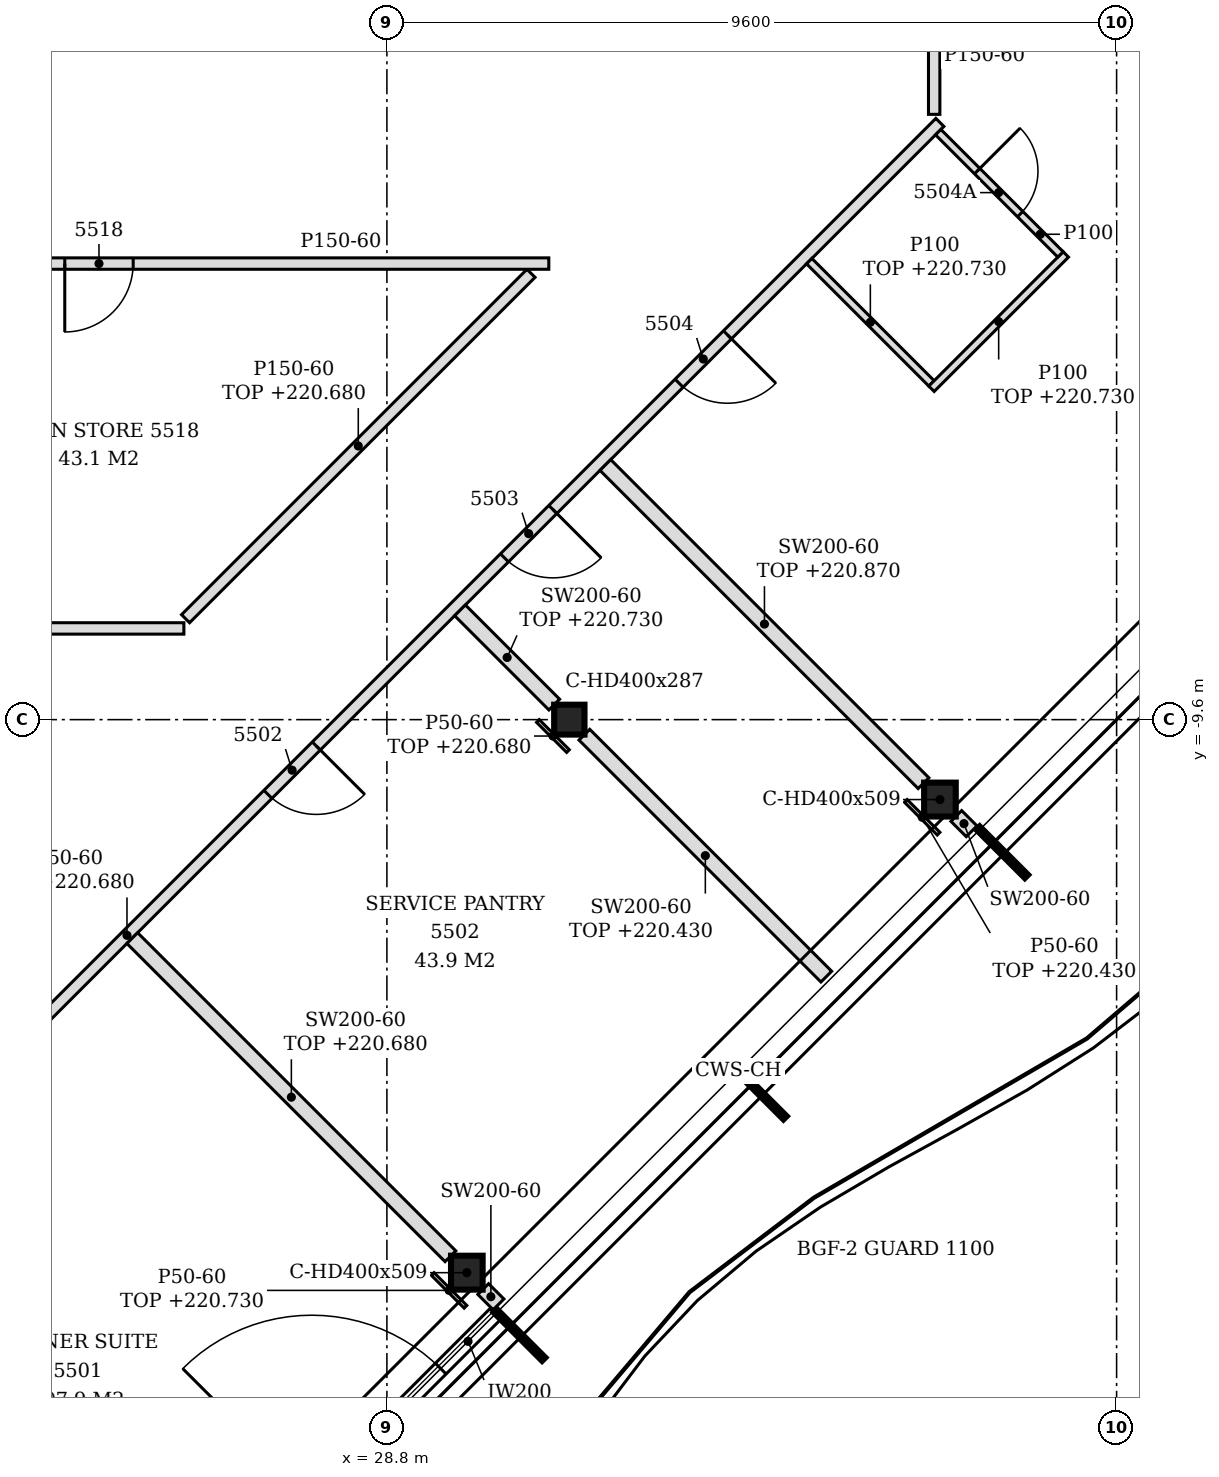
"""IFC4 building model, lengths in metres.
Left out: names, types, materials, properties, quantities, classifications, styles, units other than length and angle.
Written with IfcOpenShell. Run it as: python <this file> out.ifc"""

import sys

from ifc_helpers import new_model, si_unit, direction, frame, frame_2d, origin, origin_2d, place, context, subcontext, project, spatial, polyline, rectangle, i_section, outline, extrude, element, fill, save


model = new_model("IFC4")
c1 = context("Model", 3, precision=1e-05, world=origin(), true_north=direction((0.0, 1.0)))
c2 = subcontext(c1, "Body", "Model", "MODEL_VIEW")
j1 = project(units=[si_unit("LENGTHUNIT", "METRE"), si_unit("PLANEANGLEUNIT", "RADIAN")], contexts=[c1])
p1 = place(None, origin())
s1 = spatial("IfcSite", under=j1, at=p1, CompositionType="ELEMENT")
p2 = place(p1, origin())
s2 = spatial("IfcBuilding", under=s1, at=p2, CompositionType="ELEMENT")
p3 = place(p2, frame((0.0, 0.0, 217.8)))
s3 = spatial("IfcBuildingStorey", under=s2, at=p3, CompositionType="ELEMENT", Elevation=217.8)
for number, where, z_axis, x_axis in (
    (1, (29.852, -16.876, -0.15), (0.0, 0.0, 1.0), (1.0, 0.0, 0.0)),
    (2, (36.076, -10.652, -0.15), (0.0, 0.0, 1.0), (1.0, 0.0, 0.0)),
):
    element("IfcColumn", number, at=place(p3, frame(where, z_axis=z_axis, x_axis=x_axis)), inside=s3, PredefinedType="COLUMN", context=c2, shape_type="SweptSolid", body=[
        extrude(i_section(OverallWidth=0.416, OverallDepth=0.446, WebThickness=0.039, FlangeThickness=0.063, FilletRadius=0.015, at=origin_2d()), origin(), (0.0, 0.0, 1.0), 3.6),
    ])
p4 = place(p3, frame((31.2, -9.6, -0.15), z_axis=(0.0, 0.0, 1.0), x_axis=(1.0, 0.0, 0.0)))
e3 = element("IfcColumn", 3, at=p4, inside=s3, PredefinedType="COLUMN", context=c2, shape_type="SweptSolid", body=[
    extrude(i_section(OverallWidth=0.399, OverallDepth=0.393, WebThickness=0.023, FlangeThickness=0.037, FilletRadius=0.015, at=origin_2d()), origin(), (0.0, 0.0, 1.0), 3.6),
])
p5 = place(p3, frame((27.093, -20.553, 0.0), z_axis=(0.0, 0.0, 1.0), x_axis=(0.707079231393, 0.707134329907, 0.0)))
e4 = element("IfcWall", 4, at=p5, inside=s3, PredefinedType="NOTDEFINED", context=c2, shape_type="SweptSolid", body=[
    extrude(rectangle(XDim=4.431, YDim=0.2, at=frame_2d((2.215, 0.0))), origin(), (0.0, 0.0, 1.0), 3.45),
])
p6 = place(p5, frame((1.015, 0.0, 0.0)))
e5 = element("IfcOpeningElement", 5, at=p6, cuts=e4, PredefinedType="OPENING", context=c2, shape_type="SweptSolid", body=[
    extrude(rectangle(XDim=2.4, YDim=2.4, at=frame_2d((1.2, 1.2))), frame((0.0, 0.11, 0.0), z_axis=(0.0, -1.0, 0.0), x_axis=(1.0, 0.0, 0.0)), (0.0, 0.0, 1.0), 0.22),
])
p7 = place(p3, frame((30.269, -17.293, 0.0), z_axis=(0.0, 0.0, 1.0), x_axis=(-0.707106781187, 0.707106781187, 0.0)))
e6 = element("IfcWall", 6, at=p7, inside=s3, PredefinedType="PARTITIONING", context=c2, shape_type="SweptSolid", body=[
    extrude(rectangle(XDim=0.285, YDim=0.2, at=frame_2d((0.143, 0.0))), origin(), (0.0, 0.0, 1.0), 3.45),
])
p8 = place(p3, frame((21.146, -16.672, 0.0), z_axis=(0.0, 0.0, 1.0), x_axis=(0.707100999376, 0.70711256295, 0.0)))
e7 = element("IfcWall", 7, at=p8, inside=s3, PredefinedType="PARTITIONING", context=c2, shape_type="SweptSolid", body=[
    extrude(rectangle(XDim=21.113, YDim=0.15, at=frame_2d((10.556, 0.0))), origin(), (0.0, 0.0, 1.0), 2.88),
])
p9 = place(p8, frame((2.466, 0.0, 0.0)))
e8 = element("IfcOpeningElement", 8, at=p9, cuts=e7, PredefinedType="OPENING", context=c2, shape_type="SweptSolid", body=[
    extrude(rectangle(XDim=0.9, YDim=2.1, at=frame_2d((0.45, 1.05))), frame((0.0, 0.085, 0.0), z_axis=(0.0, -1.0, 0.0), x_axis=(1.0, 0.0, 0.0)), (0.0, 0.0, 1.0), 0.17),
])
p10 = place(p8, frame((8.611, 0.0, 0.0)))
e9 = element("IfcOpeningElement", 9, at=p10, cuts=e7, PredefinedType="OPENING", context=c2, shape_type="SweptSolid", body=[
    extrude(rectangle(XDim=0.9, YDim=2.1, at=frame_2d((0.45, 1.05))), frame((0.0, 0.085, 0.0), z_axis=(0.0, -1.0, 0.0), x_axis=(1.0, 0.0, 0.0)), (0.0, 0.0, 1.0), 0.17),
])
p11 = place(p8, frame((13.012, 0.0, 0.0)))
e10 = element("IfcOpeningElement", 10, at=p11, cuts=e7, PredefinedType="OPENING", context=c2, shape_type="SweptSolid", body=[
    extrude(rectangle(XDim=0.9, YDim=2.1, at=frame_2d((0.45, 1.05))), frame((0.0, 0.085, 0.0), z_axis=(0.0, -1.0, 0.0), x_axis=(1.0, 0.0, 0.0)), (0.0, 0.0, 1.0), 0.17),
])
p12 = place(p8, frame((16.261, 0.0, 0.0)))
e11 = element("IfcOpeningElement", 11, at=p12, cuts=e7, PredefinedType="OPENING", context=c2, shape_type="SweptSolid", body=[
    extrude(rectangle(XDim=0.9, YDim=2.1, at=frame_2d((0.45, 1.05))), frame((0.0, 0.085, 0.0), z_axis=(0.0, -1.0, 0.0), x_axis=(1.0, 0.0, 0.0)), (0.0, 0.0, 1.0), 0.17),
])
p13 = place(p3, frame((29.636, -16.66, 0.0), z_axis=(0.0, 0.0, 1.0), x_axis=(-0.707106781187, 0.707106781187, 0.0)))
e12 = element("IfcWall", 12, at=p13, inside=s3, PredefinedType="PARTITIONING", context=c2, shape_type="SweptSolid", body=[
    extrude(rectangle(XDim=5.92, YDim=0.2, at=frame_2d((2.96, 0.0))), origin(), (0.0, 0.0, 1.0), 2.88),
])
p14 = place(p3, frame((34.581, -12.981, 0.0), z_axis=(0.0, 0.0, 1.0), x_axis=(-0.707133900936, 0.707079660397, 0.0)))
e13 = element("IfcWall", 13, at=p14, inside=s3, PredefinedType="PARTITIONING", context=c2, shape_type="SweptSolid", body=[
    extrude(rectangle(XDim=4.501, YDim=0.2, at=frame_2d((2.25, 0.0))), origin(), (0.0, 0.0, 1.0), 2.63),
])
p15 = place(p3, frame((36.493, -11.069, 0.0), z_axis=(0.0, 0.0, 1.0), x_axis=(-0.707534423513, 0.706678880075, 0.0)))
e14 = element("IfcWall", 14, at=p15, inside=s3, PredefinedType="PARTITIONING", context=c2, shape_type="SweptSolid", body=[
    extrude(rectangle(XDim=0.285, YDim=0.2, at=frame_2d((0.143, 0.0))), origin(), (0.0, 0.0, 1.0), 3.45),
])
p16 = place(p3, frame((35.86, -10.436, 0.0), z_axis=(0.0, 0.0, 1.0), x_axis=(-0.707106781187, 0.707106781187, 0.0)))
e15 = element("IfcWall", 15, at=p16, inside=s3, PredefinedType="PARTITIONING", context=c2, shape_type="SweptSolid", body=[
    extrude(rectangle(XDim=5.92, YDim=0.2, at=frame_2d((2.96, 0.0))), origin(), (0.0, 0.0, 1.0), 3.07),
])
p17 = place(p3, frame((31.002, -9.402, 0.0), z_axis=(0.0, 0.0, 1.0), x_axis=(-0.707106781187, 0.707106781187, 0.0)))
e16 = element("IfcWall", 16, at=p17, inside=s3, PredefinedType="PARTITIONING", context=c2, shape_type="SweptSolid", body=[
    extrude(rectangle(XDim=1.754, YDim=0.2, at=frame_2d((0.877, 0.0))), origin(), (0.0, 0.0, 1.0), 2.93),
])
p18 = place(p3, frame((21.215, -8.4, 0.0), z_axis=(0.0, 0.0, 1.0), x_axis=(1.0, 0.0, 0.0)))
e17 = element("IfcWall", 17, at=p18, inside=s3, PredefinedType="PARTITIONING", context=c2, shape_type="SweptSolid", body=[
    extrude(rectangle(XDim=4.914, YDim=0.15, at=frame_2d((2.457, 0.0))), origin(), (0.0, 0.0, 1.0), 3.45),
])
p19 = place(p3, frame((26.151, -8.272, 0.0), z_axis=(0.0, 0.0, 1.0), x_axis=(0.707163762272, 0.707049795509, 0.0)))
e18 = element("IfcWall", 18, at=p19, inside=s3, PredefinedType="PARTITIONING", context=c2, shape_type="SweptSolid", body=[
    extrude(rectangle(XDim=6.427, YDim=0.15, at=frame_2d((3.213, 0.0))), origin(), (0.0, 0.0, 1.0), 2.88),
])
p20 = place(p3, frame((35.965, -5.177, 0.0), z_axis=(0.0, 0.0, 1.0), x_axis=(-0.707160441348, 0.707053116953, 0.0)))
e19 = element("IfcWall", 19, at=p20, inside=s3, PredefinedType="PARTITIONING", context=c2, shape_type="SweptSolid", body=[
    extrude(rectangle(XDim=2.275, YDim=0.1, at=frame_2d((1.137, 0.0))), origin(), (0.0, 0.0, 1.0), 2.93),
])
p21 = place(p3, frame((35.965, -5.247, 0.0), z_axis=(0.0, 0.0, 1.0), x_axis=(0.707155609469, 0.707057949532, 0.0)))
e20 = element("IfcWall", 20, at=p21, inside=s3, PredefinedType="PARTITIONING", context=c2, shape_type="SweptSolid", body=[
    extrude(rectangle(XDim=2.5, YDim=0.1, at=frame_2d((1.25, 0.0))), origin(), (0.0, 0.0, 1.0), 2.93),
])
p22 = place(p3, frame((19.125, -3.6, 0.0), z_axis=(0.0, 0.0, 1.0), x_axis=(1.0, 0.0, 0.0)))
e21 = element("IfcWall", 21, at=p22, inside=s3, PredefinedType="PARTITIONING", context=c2, shape_type="SweptSolid", body=[
    extrude(outline(polyline([(0.0, 0.0), (11.805, 0.0), (11.805, 3.45), (0.225, 3.45), (0.223, 2.83), (0.0, 2.83), (0.0, 0.0)])), frame((0.0, 0.075, 0.0), z_axis=(0.0, -1.0, 0.0), x_axis=(1.0, 0.0, 0.0)), (0.0, 0.0, 1.0), 0.15),
])
p23 = place(p22, frame((5.437, 0.0, 0.0)))
e22 = element("IfcOpeningElement", 22, at=p23, cuts=e21, PredefinedType="OPENING", context=c2, shape_type="SweptSolid", body=[
    extrude(rectangle(XDim=0.9, YDim=2.1, at=frame_2d((0.45, 1.05))), frame((0.0, 0.085, 0.0), z_axis=(0.0, -1.0, 0.0), x_axis=(1.0, 0.0, 0.0)), (0.0, 0.0, 1.0), 0.17),
])
p24 = place(p3, frame((37.662, -3.479, 0.0), z_axis=(0.0, 0.0, 1.0), x_axis=(-0.707160441348, 0.707053116953, 0.0)))
e23 = element("IfcWall", 23, at=p24, inside=s3, PredefinedType="PARTITIONING", context=c2, shape_type="SweptSolid", body=[
    extrude(rectangle(XDim=2.275, YDim=0.1, at=frame_2d((1.137, 0.0))), origin(), (0.0, 0.0, 1.0), 3.45),
])
p25 = place(p24, frame((0.75, 0.0, 0.0)))
e24 = element("IfcOpeningElement", 24, at=p25, cuts=e23, PredefinedType="OPENING", context=c2, shape_type="SweptSolid", body=[
    extrude(rectangle(XDim=0.8, YDim=2.1, at=frame_2d((0.4, 1.05))), frame((0.0, 0.06, 0.0), z_axis=(0.0, -1.0, 0.0), x_axis=(1.0, 0.0, 0.0)), (0.0, 0.0, 1.0), 0.12),
])
p26 = place(p3, frame((36.0, -1.637, 0.0), z_axis=(0.0, 0.0, 1.0), x_axis=(0.0, 1.0, 0.0)))
e25 = element("IfcWall", 25, at=p26, inside=s3, PredefinedType="PARTITIONING", context=c2, shape_type="SweptSolid", body=[
    extrude(outline(polyline([(0.0, 0.0), (1.537, 0.0), (1.537, 2.88), (1.532, 2.88), (1.53, 3.45), (0.0, 3.45), (0.0, 0.0)])), frame((0.0, 0.075, 0.0), z_axis=(0.0, -1.0, 0.0), x_axis=(1.0, 0.0, 0.0)), (0.0, 0.0, 1.0), 0.15),
])
p27 = place(p3, frame((29.834, -17.324, 0.0), z_axis=(0.0, 0.0, 1.0), x_axis=(-0.706906496032, 0.707307009627, 0.0)))
e26 = element("IfcWall", 26, at=p27, inside=s3, PredefinedType="PARTITIONING", context=c2, shape_type="SweptSolid", body=[
    extrude(rectangle(XDim=0.61, YDim=0.05, at=frame_2d((0.305, 0.0))), origin(), (0.0, 0.0, 1.0), 2.93),
])
p28 = place(p3, frame((31.182, -10.014, 0.0), z_axis=(0.0, 0.0, 1.0), x_axis=(-0.707106781187, 0.707106781187, 0.0)))
e27 = element("IfcWall", 27, at=p28, inside=s3, PredefinedType="PARTITIONING", context=c2, shape_type="SweptSolid", body=[
    extrude(rectangle(XDim=0.56, YDim=0.05, at=frame_2d((0.28, 0.0))), origin(), (0.0, 0.0, 1.0), 2.88),
])
p29 = place(p3, frame((36.058, -11.1, 0.0), z_axis=(0.0, 0.0, 1.0), x_axis=(-0.707307009627, 0.706906496032, 0.0)))
e28 = element("IfcWall", 28, at=p29, inside=s3, PredefinedType="PARTITIONING", context=c2, shape_type="SweptSolid", body=[
    extrude(rectangle(XDim=0.61, YDim=0.05, at=frame_2d((0.305, 0.0))), origin(), (0.0, 0.0, 1.0), 2.63),
])
p30 = place(p6, origin())
e29 = element("IfcDoor", 29, at=p30, inside=s3, OperationType="SINGLE_SWING_LEFT", PredefinedType="DOOR", context=c2, shape_type="SweptSolid", body=[
    extrude(rectangle(XDim=2.4, YDim=2.4, at=frame_2d((1.2, 1.2))), frame((0.0, 0.025, 0.0), z_axis=(0.0, -1.0, 0.0), x_axis=(1.0, 0.0, 0.0)), (0.0, 0.0, 1.0), 0.05),
])
fill(e5, e29)
p31 = place(p10, frame((0.9, 0.0, 0.0), z_axis=(0.0, 0.0, 1.0), x_axis=(-1.0, 0.0, 0.0)))
e30 = element("IfcDoor", 30, at=p31, inside=s3, OperationType="SINGLE_SWING_LEFT", PredefinedType="DOOR", context=c2, shape_type="SweptSolid", body=[
    extrude(rectangle(XDim=0.9, YDim=2.1, at=frame_2d((0.45, 1.05))), frame((0.0, 0.025, 0.0), z_axis=(0.0, -1.0, 0.0), x_axis=(1.0, 0.0, 0.0)), (0.0, 0.0, 1.0), 0.05),
])
fill(e9, e30)
p32 = place(p11, frame((0.9, 0.0, 0.0), z_axis=(0.0, 0.0, 1.0), x_axis=(-1.0, 0.0, 0.0)))
e31 = element("IfcDoor", 31, at=p32, inside=s3, OperationType="SINGLE_SWING_LEFT", PredefinedType="DOOR", context=c2, shape_type="SweptSolid", body=[
    extrude(rectangle(XDim=0.9, YDim=2.1, at=frame_2d((0.45, 1.05))), frame((0.0, 0.025, 0.0), z_axis=(0.0, -1.0, 0.0), x_axis=(1.0, 0.0, 0.0)), (0.0, 0.0, 1.0), 0.05),
])
fill(e10, e31)
p33 = place(p12, frame((0.9, 0.0, 0.0), z_axis=(0.0, 0.0, 1.0), x_axis=(-1.0, 0.0, 0.0)))
e32 = element("IfcDoor", 32, at=p33, inside=s3, OperationType="SINGLE_SWING_LEFT", PredefinedType="DOOR", context=c2, shape_type="SweptSolid", body=[
    extrude(rectangle(XDim=0.9, YDim=2.1, at=frame_2d((0.45, 1.05))), frame((0.0, 0.025, 0.0), z_axis=(0.0, -1.0, 0.0), x_axis=(1.0, 0.0, 0.0)), (0.0, 0.0, 1.0), 0.05),
])
fill(e11, e32)
p34 = place(p25, frame((0.8, 0.0, 0.0), z_axis=(0.0, 0.0, 1.0), x_axis=(-1.0, 0.0, 0.0)))
e33 = element("IfcDoor", 33, at=p34, inside=s3, OperationType="SINGLE_SWING_LEFT", PredefinedType="DOOR", context=c2, shape_type="SweptSolid", body=[
    extrude(rectangle(XDim=0.8, YDim=2.1, at=frame_2d((0.4, 1.05))), frame((0.0, 0.025, 0.0), z_axis=(0.0, -1.0, 0.0), x_axis=(1.0, 0.0, 0.0)), (0.0, 0.0, 1.0), 0.05),
])
fill(e24, e33)
p35 = place(p23, frame((0.9, 0.0, 0.0), z_axis=(0.0, 0.0, 1.0), x_axis=(-1.0, 0.0, 0.0)))
e34 = element("IfcDoor", 34, at=p35, inside=s3, OperationType="SINGLE_SWING_RIGHT", PredefinedType="DOOR", context=c2, shape_type="SweptSolid", body=[
    extrude(rectangle(XDim=0.9, YDim=2.1, at=frame_2d((0.45, 1.05))), frame((0.0, 0.025, 0.0), z_axis=(0.0, -1.0, 0.0), x_axis=(1.0, 0.0, 0.0)), (0.0, 0.0, 1.0), 0.05),
])
fill(e22, e34)
save(model, sys.argv[1])
